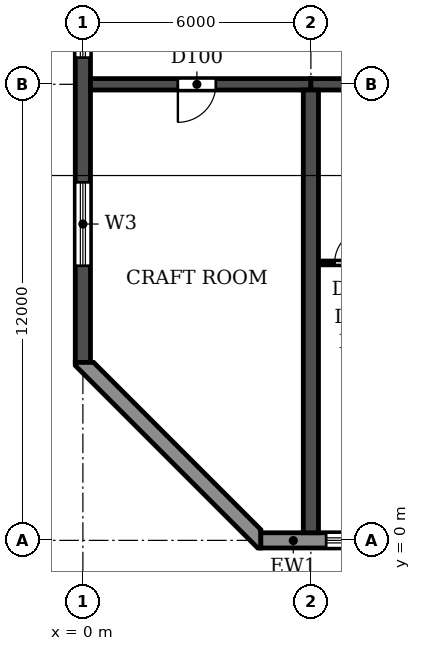
"""IFC4 building model, lengths in metres.
Left out: names, types, materials, properties, quantities, classifications, styles, units other than length and angle.
Written with IfcOpenShell. Run it as: python <this file> out.ifc"""

import sys

from ifc_helpers import new_model, si_unit, direction, frame, frame_2d, origin, place, context, subcontext, project, spatial, polyline, rectangle, outline, extrude, element, fill, save


model = new_model("IFC4")
c1 = context("Model", 3, precision=1e-05, world=origin(), true_north=direction((0.0, 1.0)))
c2 = subcontext(c1, "Body", "Model", "MODEL_VIEW")
j1 = project(units=[si_unit("LENGTHUNIT", "METRE"), si_unit("PLANEANGLEUNIT", "RADIAN")], contexts=[c1])
p1 = place(None, origin())
s1 = spatial("IfcSite", under=j1, at=p1, CompositionType="ELEMENT")
p2 = place(p1, origin())
s2 = spatial("IfcBuilding", under=s1, at=p2, CompositionType="ELEMENT")
p3 = place(p2, frame((0.0, 0.0, 49.8)))
s3 = spatial("IfcBuildingStorey", under=s2, at=p3, CompositionType="ELEMENT", Elevation=49.8)
p4 = place(p3, frame((6.0, 0.2, 0.0), z_axis=(0.0, 0.0, 1.0), x_axis=(0.0, 1.0, 0.0)))
e1 = element("IfcWall", 1, at=p4, inside=s3, PredefinedType="SHEAR", context=c2, shape_type="SweptSolid", body=[
    extrude(rectangle(XDim=11.65, YDim=0.4, at=frame_2d((5.825, 0.0))), origin(), (0.0, 0.0, 1.0), 3.0),
])
p5 = place(p3, frame((0.0, 4.683, 0.0), z_axis=(0.0, 0.0, 1.0), x_axis=(0.0, 1.0, 0.0)))
e2 = element("IfcWall", 2, at=p5, inside=s3, PredefinedType="SHEAR", context=c2, shape_type="SweptSolid", body=[
    extrude(rectangle(XDim=35.434, YDim=0.4, at=frame_2d((17.717, 0.0))), origin(), (0.0, 0.0, 1.0), 3.0),
])
p6 = place(p5, frame((23.817, 0.0, 0.9)))
e3 = element("IfcOpeningElement", 3, at=p6, cuts=e2, PredefinedType="OPENING", context=c2, shape_type="SweptSolid", body=[
    extrude(rectangle(XDim=1.2, YDim=1.5, at=frame_2d((0.6, 0.75))), frame((0.0, 0.21, 0.0), z_axis=(0.0, -1.0, 0.0), x_axis=(1.0, 0.0, 0.0)), (0.0, 0.0, 1.0), 0.42),
])
p7 = place(p5, frame((8.017, 0.0, 0.9)))
e4 = element("IfcOpeningElement", 4, at=p7, cuts=e2, PredefinedType="OPENING", context=c2, shape_type="SweptSolid", body=[
    extrude(rectangle(XDim=1.2, YDim=1.5, at=frame_2d((0.6, 0.75))), frame((0.0, 0.21, 0.0), z_axis=(0.0, -1.0, 0.0), x_axis=(1.0, 0.0, 0.0)), (0.0, 0.0, 1.0), 0.42),
])
p8 = place(p5, frame((15.917, 0.0, 0.9)))
e5 = element("IfcOpeningElement", 5, at=p8, cuts=e2, PredefinedType="OPENING", context=c2, shape_type="SweptSolid", body=[
    extrude(rectangle(XDim=1.2, YDim=1.5, at=frame_2d((0.6, 0.75))), frame((0.0, 0.21, 0.0), z_axis=(0.0, -1.0, 0.0), x_axis=(1.0, 0.0, 0.0)), (0.0, 0.0, 1.0), 0.42),
])
p9 = place(p5, frame((29.493, 0.0, 0.6)))
e6 = element("IfcOpeningElement", 6, at=p9, cuts=e2, PredefinedType="OPENING", context=c2, shape_type="SweptSolid", body=[
    extrude(rectangle(XDim=2.2, YDim=1.8, at=frame_2d((1.1, 0.9))), frame((0.0, 0.21, 0.0), z_axis=(0.0, -1.0, 0.0), x_axis=(1.0, 0.0, 0.0)), (0.0, 0.0, 1.0), 0.42),
])
p10 = place(p5, frame((2.541, 0.0, 0.6)))
e7 = element("IfcOpeningElement", 7, at=p10, cuts=e2, PredefinedType="OPENING", context=c2, shape_type="SweptSolid", body=[
    extrude(rectangle(XDim=2.2, YDim=1.8, at=frame_2d((1.1, 0.9))), frame((0.0, 0.21, 0.0), z_axis=(0.0, -1.0, 0.0), x_axis=(1.0, 0.0, 0.0)), (0.0, 0.0, 1.0), 0.42),
])
p11 = place(p3, frame((0.2, 12.0, 0.0), z_axis=(0.0, 0.0, 1.0), x_axis=(1.0, 0.0, 0.0)))
e8 = element("IfcWall", 8, at=p11, inside=s3, PredefinedType="SHEAR", context=c2, shape_type="SweptSolid", body=[
    extrude(rectangle(XDim=5.8, YDim=0.3, at=frame_2d((2.9, 0.0))), origin(), (0.0, 0.0, 1.0), 2.4),
])
p12 = place(p11, frame((2.3, 0.0, 0.0)))
e9 = element("IfcOpeningElement", 9, at=p12, cuts=e8, PredefinedType="OPENING", context=c2, shape_type="SweptSolid", body=[
    extrude(rectangle(XDim=1.0, YDim=2.1, at=frame_2d((0.5, 1.05))), frame((0.0, 0.16, 0.0), z_axis=(0.0, -1.0, 0.0), x_axis=(1.0, 0.0, 0.0)), (0.0, 0.0, 1.0), 0.32),
])
p13 = place(p3, frame((6.0, 12.0, 0.0), z_axis=(0.0, 0.0, 1.0), x_axis=(1.0, 0.0, 0.0)))
e10 = element("IfcWall", 10, at=p13, inside=s3, PredefinedType="SHEAR", context=c2, shape_type="SweptSolid", body=[
    extrude(rectangle(XDim=6.0, YDim=0.3, at=frame_2d((3.0, 0.0))), origin(), (0.0, 0.0, 1.0), 2.4),
])
p14 = place(p13, frame((2.55, 0.0, 0.0)))
e11 = element("IfcOpeningElement", 11, at=p14, cuts=e10, PredefinedType="OPENING", context=c2, shape_type="SweptSolid", body=[
    extrude(rectangle(XDim=1.0, YDim=2.1, at=frame_2d((0.5, 1.05))), frame((0.0, 0.16, 0.0), z_axis=(0.0, -1.0, 0.0), x_axis=(1.0, 0.0, 0.0)), (0.0, 0.0, 1.0), 0.32),
])
p15 = place(p3, frame((4.683, 0.0, 0.0), z_axis=(0.0, 0.0, 1.0), x_axis=(1.0, 0.0, 0.0)))
e12 = element("IfcWall", 12, at=p15, inside=s3, PredefinedType="STANDARD", context=c2, shape_type="SweptSolid", body=[
    extrude(rectangle(XDim=92.634, YDim=0.4, at=frame_2d((46.317, 0.0))), origin(), (0.0, 0.0, 1.0), 3.0),
])
p16 = place(p15, frame((1.717, 0.0, 0.9)))
e13 = element("IfcOpeningElement", 13, at=p16, cuts=e12, PredefinedType="OPENING", context=c2, shape_type="SweptSolid", body=[
    extrude(rectangle(XDim=2.2, YDim=1.5, at=frame_2d((1.1, 0.75))), frame((0.0, 0.21, 0.0), z_axis=(0.0, -1.0, 0.0), x_axis=(1.0, 0.0, 0.0)), (0.0, 0.0, 1.0), 0.42),
])
p17 = place(p15, frame((4.717, 0.0, 0.9)))
e14 = element("IfcOpeningElement", 14, at=p17, cuts=e12, PredefinedType="OPENING", context=c2, shape_type="SweptSolid", body=[
    extrude(rectangle(XDim=2.2, YDim=1.5, at=frame_2d((1.1, 0.75))), frame((0.0, 0.21, 0.0), z_axis=(0.0, -1.0, 0.0), x_axis=(1.0, 0.0, 0.0)), (0.0, 0.0, 1.0), 0.42),
])
p18 = place(p15, frame((7.717, 0.0, 0.9)))
e15 = element("IfcOpeningElement", 15, at=p18, cuts=e12, PredefinedType="OPENING", context=c2, shape_type="SweptSolid", body=[
    extrude(rectangle(XDim=2.2, YDim=1.5, at=frame_2d((1.1, 0.75))), frame((0.0, 0.21, 0.0), z_axis=(0.0, -1.0, 0.0), x_axis=(1.0, 0.0, 0.0)), (0.0, 0.0, 1.0), 0.42),
])
p19 = place(p15, frame((10.917, 0.0, 0.0)))
e16 = element("IfcOpeningElement", 16, at=p19, cuts=e12, PredefinedType="OPENING", context=c2, shape_type="SweptSolid", body=[
    extrude(rectangle(XDim=1.8, YDim=2.4, at=frame_2d((0.9, 1.2))), frame((0.0, 0.21, 0.0), z_axis=(0.0, -1.0, 0.0), x_axis=(1.0, 0.0, 0.0)), (0.0, 0.0, 1.0), 0.42),
])
p20 = place(p15, frame((13.717, 0.0, 0.9)))
e17 = element("IfcOpeningElement", 17, at=p20, cuts=e12, PredefinedType="OPENING", context=c2, shape_type="SweptSolid", body=[
    extrude(rectangle(XDim=2.2, YDim=1.5, at=frame_2d((1.1, 0.75))), frame((0.0, 0.21, 0.0), z_axis=(0.0, -1.0, 0.0), x_axis=(1.0, 0.0, 0.0)), (0.0, 0.0, 1.0), 0.42),
])
p21 = place(p15, frame((16.717, 0.0, 0.9)))
e18 = element("IfcOpeningElement", 18, at=p21, cuts=e12, PredefinedType="OPENING", context=c2, shape_type="SweptSolid", body=[
    extrude(rectangle(XDim=2.2, YDim=1.5, at=frame_2d((1.1, 0.75))), frame((0.0, 0.21, 0.0), z_axis=(0.0, -1.0, 0.0), x_axis=(1.0, 0.0, 0.0)), (0.0, 0.0, 1.0), 0.42),
])
p22 = place(p15, frame((19.917, 0.0, 0.0)))
e19 = element("IfcOpeningElement", 19, at=p22, cuts=e12, PredefinedType="OPENING", context=c2, shape_type="SweptSolid", body=[
    extrude(rectangle(XDim=1.8, YDim=2.4, at=frame_2d((0.9, 1.2))), frame((0.0, 0.21, 0.0), z_axis=(0.0, -1.0, 0.0), x_axis=(1.0, 0.0, 0.0)), (0.0, 0.0, 1.0), 0.42),
])
p23 = place(p15, frame((22.717, 0.0, 0.9)))
e20 = element("IfcOpeningElement", 20, at=p23, cuts=e12, PredefinedType="OPENING", context=c2, shape_type="SweptSolid", body=[
    extrude(rectangle(XDim=2.2, YDim=1.5, at=frame_2d((1.1, 0.75))), frame((0.0, 0.21, 0.0), z_axis=(0.0, -1.0, 0.0), x_axis=(1.0, 0.0, 0.0)), (0.0, 0.0, 1.0), 0.42),
])
p24 = place(p15, frame((25.717, 0.0, 0.9)))
e21 = element("IfcOpeningElement", 21, at=p24, cuts=e12, PredefinedType="OPENING", context=c2, shape_type="SweptSolid", body=[
    extrude(rectangle(XDim=2.2, YDim=1.5, at=frame_2d((1.1, 0.75))), frame((0.0, 0.21, 0.0), z_axis=(0.0, -1.0, 0.0), x_axis=(1.0, 0.0, 0.0)), (0.0, 0.0, 1.0), 0.42),
])
p25 = place(p15, frame((28.717, 0.0, 0.9)))
e22 = element("IfcOpeningElement", 22, at=p25, cuts=e12, PredefinedType="OPENING", context=c2, shape_type="SweptSolid", body=[
    extrude(rectangle(XDim=2.2, YDim=1.5, at=frame_2d((1.1, 0.75))), frame((0.0, 0.21, 0.0), z_axis=(0.0, -1.0, 0.0), x_axis=(1.0, 0.0, 0.0)), (0.0, 0.0, 1.0), 0.42),
])
p26 = place(p15, frame((31.717, 0.0, 0.9)))
e23 = element("IfcOpeningElement", 23, at=p26, cuts=e12, PredefinedType="OPENING", context=c2, shape_type="SweptSolid", body=[
    extrude(rectangle(XDim=2.2, YDim=1.5, at=frame_2d((1.1, 0.75))), frame((0.0, 0.21, 0.0), z_axis=(0.0, -1.0, 0.0), x_axis=(1.0, 0.0, 0.0)), (0.0, 0.0, 1.0), 0.42),
])
p27 = place(p15, frame((34.917, 0.0, 0.0)))
e24 = element("IfcOpeningElement", 24, at=p27, cuts=e12, PredefinedType="OPENING", context=c2, shape_type="SweptSolid", body=[
    extrude(rectangle(XDim=1.8, YDim=2.4, at=frame_2d((0.9, 1.2))), frame((0.0, 0.21, 0.0), z_axis=(0.0, -1.0, 0.0), x_axis=(1.0, 0.0, 0.0)), (0.0, 0.0, 1.0), 0.42),
])
p28 = place(p15, frame((37.717, 0.0, 0.9)))
e25 = element("IfcOpeningElement", 25, at=p28, cuts=e12, PredefinedType="OPENING", context=c2, shape_type="SweptSolid", body=[
    extrude(rectangle(XDim=2.2, YDim=1.5, at=frame_2d((1.1, 0.75))), frame((0.0, 0.21, 0.0), z_axis=(0.0, -1.0, 0.0), x_axis=(1.0, 0.0, 0.0)), (0.0, 0.0, 1.0), 0.42),
])
p29 = place(p15, frame((40.717, 0.0, 0.9)))
e26 = element("IfcOpeningElement", 26, at=p29, cuts=e12, PredefinedType="OPENING", context=c2, shape_type="SweptSolid", body=[
    extrude(rectangle(XDim=2.2, YDim=1.5, at=frame_2d((1.1, 0.75))), frame((0.0, 0.21, 0.0), z_axis=(0.0, -1.0, 0.0), x_axis=(1.0, 0.0, 0.0)), (0.0, 0.0, 1.0), 0.42),
])
p30 = place(p15, frame((43.717, 0.0, 0.9)))
e27 = element("IfcOpeningElement", 27, at=p30, cuts=e12, PredefinedType="OPENING", context=c2, shape_type="SweptSolid", body=[
    extrude(rectangle(XDim=2.2, YDim=1.5, at=frame_2d((1.1, 0.75))), frame((0.0, 0.21, 0.0), z_axis=(0.0, -1.0, 0.0), x_axis=(1.0, 0.0, 0.0)), (0.0, 0.0, 1.0), 0.42),
])
p31 = place(p15, frame((46.917, 0.0, 0.0)))
e28 = element("IfcOpeningElement", 28, at=p31, cuts=e12, PredefinedType="OPENING", context=c2, shape_type="SweptSolid", body=[
    extrude(rectangle(XDim=1.8, YDim=2.4, at=frame_2d((0.9, 1.2))), frame((0.0, 0.21, 0.0), z_axis=(0.0, -1.0, 0.0), x_axis=(1.0, 0.0, 0.0)), (0.0, 0.0, 1.0), 0.42),
])
p32 = place(p15, frame((49.717, 0.0, 0.9)))
e29 = element("IfcOpeningElement", 29, at=p32, cuts=e12, PredefinedType="OPENING", context=c2, shape_type="SweptSolid", body=[
    extrude(rectangle(XDim=2.2, YDim=1.5, at=frame_2d((1.1, 0.75))), frame((0.0, 0.21, 0.0), z_axis=(0.0, -1.0, 0.0), x_axis=(1.0, 0.0, 0.0)), (0.0, 0.0, 1.0), 0.42),
])
p33 = place(p15, frame((52.717, 0.0, 0.9)))
e30 = element("IfcOpeningElement", 30, at=p33, cuts=e12, PredefinedType="OPENING", context=c2, shape_type="SweptSolid", body=[
    extrude(rectangle(XDim=2.2, YDim=1.5, at=frame_2d((1.1, 0.75))), frame((0.0, 0.21, 0.0), z_axis=(0.0, -1.0, 0.0), x_axis=(1.0, 0.0, 0.0)), (0.0, 0.0, 1.0), 0.42),
])
p34 = place(p15, frame((55.717, 0.0, 0.9)))
e31 = element("IfcOpeningElement", 31, at=p34, cuts=e12, PredefinedType="OPENING", context=c2, shape_type="SweptSolid", body=[
    extrude(rectangle(XDim=2.2, YDim=1.5, at=frame_2d((1.1, 0.75))), frame((0.0, 0.21, 0.0), z_axis=(0.0, -1.0, 0.0), x_axis=(1.0, 0.0, 0.0)), (0.0, 0.0, 1.0), 0.42),
])
p35 = place(p15, frame((58.917, 0.0, 0.0)))
e32 = element("IfcOpeningElement", 32, at=p35, cuts=e12, PredefinedType="OPENING", context=c2, shape_type="SweptSolid", body=[
    extrude(rectangle(XDim=1.8, YDim=2.4, at=frame_2d((0.9, 1.2))), frame((0.0, 0.21, 0.0), z_axis=(0.0, -1.0, 0.0), x_axis=(1.0, 0.0, 0.0)), (0.0, 0.0, 1.0), 0.42),
])
p36 = place(p15, frame((61.717, 0.0, 0.9)))
e33 = element("IfcOpeningElement", 33, at=p36, cuts=e12, PredefinedType="OPENING", context=c2, shape_type="SweptSolid", body=[
    extrude(rectangle(XDim=2.2, YDim=1.5, at=frame_2d((1.1, 0.75))), frame((0.0, 0.21, 0.0), z_axis=(0.0, -1.0, 0.0), x_axis=(1.0, 0.0, 0.0)), (0.0, 0.0, 1.0), 0.42),
])
p37 = place(p15, frame((64.717, 0.0, 0.9)))
e34 = element("IfcOpeningElement", 34, at=p37, cuts=e12, PredefinedType="OPENING", context=c2, shape_type="SweptSolid", body=[
    extrude(rectangle(XDim=2.2, YDim=1.5, at=frame_2d((1.1, 0.75))), frame((0.0, 0.21, 0.0), z_axis=(0.0, -1.0, 0.0), x_axis=(1.0, 0.0, 0.0)), (0.0, 0.0, 1.0), 0.42),
])
p38 = place(p15, frame((67.717, 0.0, 0.9)))
e35 = element("IfcOpeningElement", 35, at=p38, cuts=e12, PredefinedType="OPENING", context=c2, shape_type="SweptSolid", body=[
    extrude(rectangle(XDim=2.2, YDim=1.5, at=frame_2d((1.1, 0.75))), frame((0.0, 0.21, 0.0), z_axis=(0.0, -1.0, 0.0), x_axis=(1.0, 0.0, 0.0)), (0.0, 0.0, 1.0), 0.42),
])
p39 = place(p15, frame((70.917, 0.0, 0.0)))
e36 = element("IfcOpeningElement", 36, at=p39, cuts=e12, PredefinedType="OPENING", context=c2, shape_type="SweptSolid", body=[
    extrude(rectangle(XDim=1.8, YDim=2.4, at=frame_2d((0.9, 1.2))), frame((0.0, 0.21, 0.0), z_axis=(0.0, -1.0, 0.0), x_axis=(1.0, 0.0, 0.0)), (0.0, 0.0, 1.0), 0.42),
])
p40 = place(p15, frame((73.717, 0.0, 0.9)))
e37 = element("IfcOpeningElement", 37, at=p40, cuts=e12, PredefinedType="OPENING", context=c2, shape_type="SweptSolid", body=[
    extrude(rectangle(XDim=2.2, YDim=1.5, at=frame_2d((1.1, 0.75))), frame((0.0, 0.21, 0.0), z_axis=(0.0, -1.0, 0.0), x_axis=(1.0, 0.0, 0.0)), (0.0, 0.0, 1.0), 0.42),
])
p41 = place(p15, frame((76.717, 0.0, 0.9)))
e38 = element("IfcOpeningElement", 38, at=p41, cuts=e12, PredefinedType="OPENING", context=c2, shape_type="SweptSolid", body=[
    extrude(rectangle(XDim=2.2, YDim=1.5, at=frame_2d((1.1, 0.75))), frame((0.0, 0.21, 0.0), z_axis=(0.0, -1.0, 0.0), x_axis=(1.0, 0.0, 0.0)), (0.0, 0.0, 1.0), 0.42),
])
p42 = place(p15, frame((79.717, 0.0, 0.9)))
e39 = element("IfcOpeningElement", 39, at=p42, cuts=e12, PredefinedType="OPENING", context=c2, shape_type="SweptSolid", body=[
    extrude(rectangle(XDim=2.2, YDim=1.5, at=frame_2d((1.1, 0.75))), frame((0.0, 0.21, 0.0), z_axis=(0.0, -1.0, 0.0), x_axis=(1.0, 0.0, 0.0)), (0.0, 0.0, 1.0), 0.42),
])
p43 = place(p15, frame((82.917, 0.0, 0.0)))
e40 = element("IfcOpeningElement", 40, at=p43, cuts=e12, PredefinedType="OPENING", context=c2, shape_type="SweptSolid", body=[
    extrude(rectangle(XDim=1.8, YDim=2.4, at=frame_2d((0.9, 1.2))), frame((0.0, 0.21, 0.0), z_axis=(0.0, -1.0, 0.0), x_axis=(1.0, 0.0, 0.0)), (0.0, 0.0, 1.0), 0.42),
])
p44 = place(p15, frame((85.717, 0.0, 0.9)))
e41 = element("IfcOpeningElement", 41, at=p44, cuts=e12, PredefinedType="OPENING", context=c2, shape_type="SweptSolid", body=[
    extrude(rectangle(XDim=2.2, YDim=1.5, at=frame_2d((1.1, 0.75))), frame((0.0, 0.21, 0.0), z_axis=(0.0, -1.0, 0.0), x_axis=(1.0, 0.0, 0.0)), (0.0, 0.0, 1.0), 0.42),
])
p45 = place(p15, frame((88.717, 0.0, 0.9)))
e42 = element("IfcOpeningElement", 42, at=p45, cuts=e12, PredefinedType="OPENING", context=c2, shape_type="SweptSolid", body=[
    extrude(rectangle(XDim=2.2, YDim=1.5, at=frame_2d((1.1, 0.75))), frame((0.0, 0.21, 0.0), z_axis=(0.0, -1.0, 0.0), x_axis=(1.0, 0.0, 0.0)), (0.0, 0.0, 1.0), 0.42),
])
p46 = place(p3, origin())
e43 = element("IfcWall", 43, at=p46, inside=s3, PredefinedType="STANDARD", context=c2, shape_type="SweptSolid", body=[
    extrude(outline(polyline([(-0.2, 4.683), (-0.2, 4.6), (4.6, -0.2), (4.683, -0.2), (4.683, 0.283), (0.283, 4.683), (-0.2, 4.683)])), origin(), (0.0, 0.0, 1.0), 3.0),
])
p47 = place(p3, frame((6.21, 7.3, 0.0), z_axis=(0.0, 0.0, 1.0), x_axis=(1.0, 0.0, 0.0)))
e44 = element("IfcWall", 44, at=p47, inside=s3, PredefinedType="PARTITIONING", context=c2, shape_type="SweptSolid", body=[
    extrude(rectangle(XDim=1.99, YDim=0.1, at=frame_2d((0.995, 0.0))), origin(), (0.0, 0.0, 1.0), 3.0),
])
p48 = place(p47, frame((0.415, 0.0, 0.0)))
e45 = element("IfcOpeningElement", 45, at=p48, cuts=e44, PredefinedType="OPENING", context=c2, shape_type="SweptSolid", body=[
    extrude(rectangle(XDim=0.9, YDim=2.1, at=frame_2d((0.45, 1.05))), frame((0.0, 0.06, 0.0), z_axis=(0.0, -1.0, 0.0), x_axis=(1.0, 0.0, 0.0)), (0.0, 0.0, 1.0), 0.12),
])
p49 = place(p16, origin())
e46 = element("IfcWindow", 46, at=p49, inside=s3, PartitioningType="DOUBLE_PANEL_HORIZONTAL", PredefinedType="WINDOW", context=c2, shape_type="SweptSolid", body=[
    extrude(rectangle(XDim=2.2, YDim=1.5, at=frame_2d((1.1, 0.75))), frame((0.0, 0.03, 0.0), z_axis=(0.0, -1.0, 0.0), x_axis=(1.0, 0.0, 0.0)), (0.0, 0.0, 1.0), 0.06),
])
fill(e13, e46)
p50 = place(p7, origin())
e47 = element("IfcWindow", 47, at=p50, inside=s3, PartitioningType="SINGLE_PANEL", PredefinedType="WINDOW", context=c2, shape_type="SweptSolid", body=[
    extrude(rectangle(XDim=1.2, YDim=1.5, at=frame_2d((0.6, 0.75))), frame((0.0, 0.03, 0.0), z_axis=(0.0, -1.0, 0.0), x_axis=(1.0, 0.0, 0.0)), (0.0, 0.0, 1.0), 0.06),
])
fill(e4, e47)
p51 = place(p10, origin())
e48 = element("IfcWindow", 48, at=p51, inside=s3, PartitioningType="DOUBLE_PANEL_HORIZONTAL", PredefinedType="WINDOW", context=c2, shape_type="SweptSolid", body=[
    extrude(rectangle(XDim=2.2, YDim=1.8, at=frame_2d((1.1, 0.9))), frame((0.0, 0.03, 0.0), z_axis=(0.0, -1.0, 0.0), x_axis=(1.0, 0.0, 0.0)), (0.0, 0.0, 1.0), 0.06),
])
fill(e7, e48)
p52 = place(p12, frame((1.0, 0.0, 0.0), z_axis=(0.0, 0.0, 1.0), x_axis=(-1.0, 0.0, 0.0)))
e49 = element("IfcDoor", 49, at=p52, inside=s3, OperationType="SINGLE_SWING_RIGHT", PredefinedType="DOOR", context=c2, shape_type="SweptSolid", body=[
    extrude(rectangle(XDim=1.0, YDim=2.1, at=frame_2d((0.5, 1.05))), frame((0.0, 0.025, 0.0), z_axis=(0.0, -1.0, 0.0), x_axis=(1.0, 0.0, 0.0)), (0.0, 0.0, 1.0), 0.05),
])
fill(e9, e49)
p53 = place(p48, origin())
e50 = element("IfcDoor", 50, at=p53, inside=s3, OperationType="SINGLE_SWING_RIGHT", PredefinedType="DOOR", context=c2, shape_type="SweptSolid", body=[
    extrude(rectangle(XDim=0.9, YDim=2.1, at=frame_2d((0.45, 1.05))), frame((0.0, 0.025, 0.0), z_axis=(0.0, -1.0, 0.0), x_axis=(1.0, 0.0, 0.0)), (0.0, 0.0, 1.0), 0.05),
])
fill(e45, e50)
save(model, sys.argv[1])
